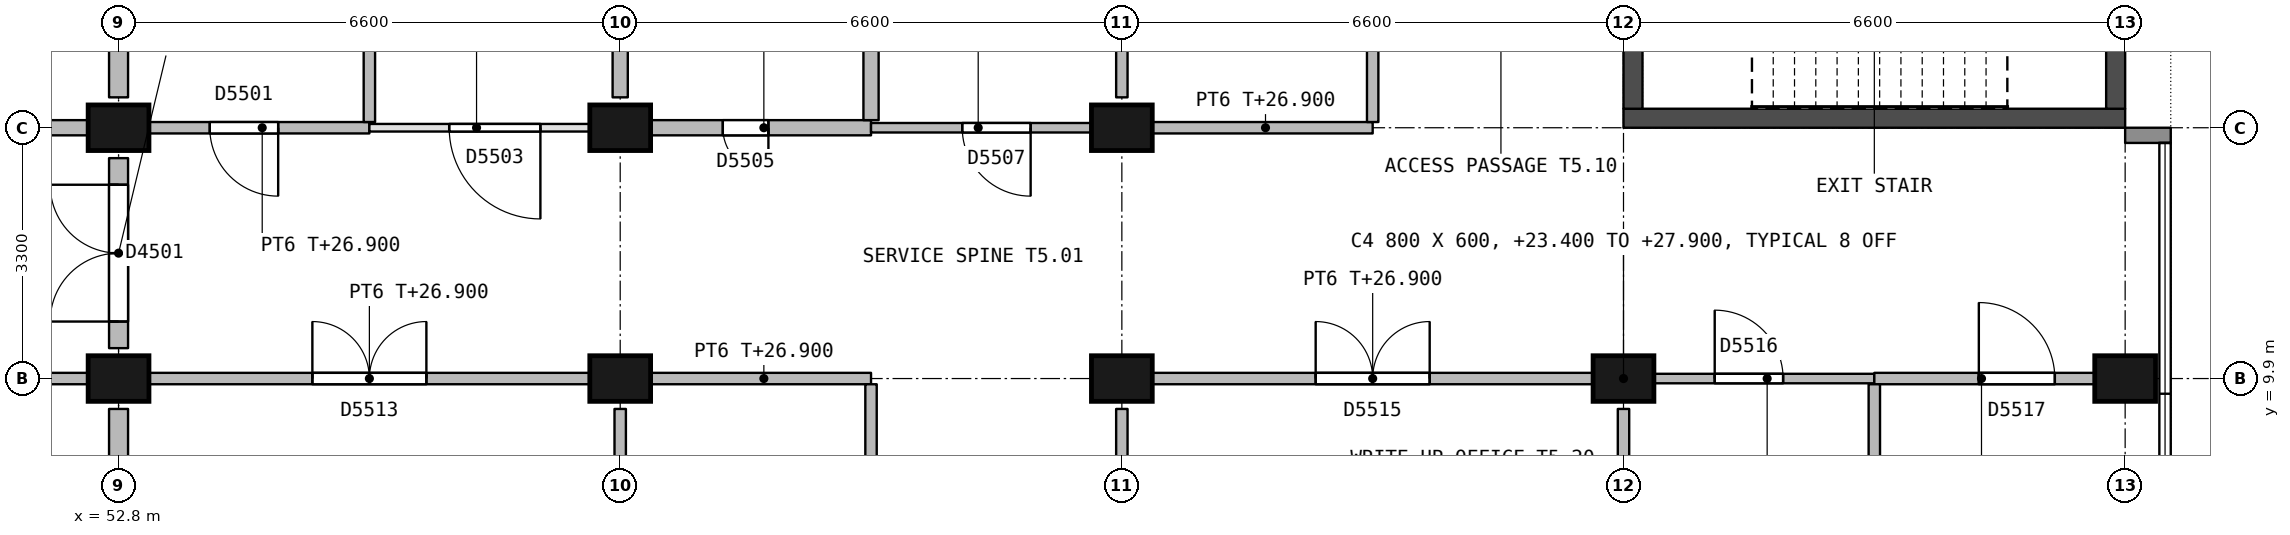
"""IFC4 building model, lengths in metres.
Left out: names, types, materials, properties, quantities, classifications, styles, units other than length and angle.
Written with IfcOpenShell. Run it as: python <this file> out.ifc"""

import sys

from ifc_helpers import new_model, si_unit, direction, frame, frame_2d, origin, origin_2d, place, context, subcontext, project, spatial, rectangle, extrude, element, fill, save


model = new_model("IFC4")
c1 = context("Model", 3, precision=1e-05, world=origin(), true_north=direction((0.0, 1.0)))
c2 = subcontext(c1, "Body", "Model", "MODEL_VIEW")
j1 = project(units=[si_unit("LENGTHUNIT", "METRE"), si_unit("PLANEANGLEUNIT", "RADIAN")], contexts=[c1])
p1 = place(None, origin())
s1 = spatial("IfcSite", under=j1, at=p1, CompositionType="ELEMENT")
p2 = place(p1, origin())
s2 = spatial("IfcBuilding", under=s1, at=p2, CompositionType="ELEMENT")
p3 = place(p2, frame((0.0, 0.0, 23.4)))
s3 = spatial("IfcBuildingStorey", under=s2, at=p3, CompositionType="ELEMENT", Elevation=23.4)
for number, where, z_axis, x_axis in (
    (1, (52.8, 9.9, 0.0), (0.0, 0.0, 1.0), (1.0, 0.0, 0.0)),
    (2, (52.8, 13.2, 0.0), (0.0, 0.0, 1.0), (1.0, 0.0, 0.0)),
    (3, (59.4, 9.9, 0.0), (0.0, 0.0, 1.0), (1.0, 0.0, 0.0)),
    (4, (59.4, 13.2, 0.0), (0.0, 0.0, 1.0), (1.0, 0.0, 0.0)),
    (5, (66.0, 9.9, 0.0), (0.0, 0.0, 1.0), (1.0, 0.0, 0.0)),
    (6, (66.0, 13.2, 0.0), (0.0, 0.0, 1.0), (1.0, 0.0, 0.0)),
    (7, (72.6, 9.9, 0.0), (0.0, 0.0, 1.0), (1.0, 0.0, 0.0)),
    (8, (79.2, 9.9, 0.0), (0.0, 0.0, 1.0), (1.0, 0.0, 0.0)),
):
    element("IfcColumn", number, at=place(p3, frame(where, z_axis=z_axis, x_axis=x_axis)), inside=s3, PredefinedType="COLUMN", context=c2, shape_type="SweptSolid", body=[
        extrude(rectangle(XDim=0.8, YDim=0.6, at=origin_2d()), origin(), (0.0, 0.0, 1.0), 4.5),
    ])
p4 = place(p3, frame((72.6, 13.325, 0.0), z_axis=(0.0, 0.0, 1.0), x_axis=(1.0, 0.0, 0.0)))
e9 = element("IfcWall", 9, at=p4, inside=s3, PredefinedType="SHEAR", context=c2, shape_type="SweptSolid", body=[
    extrude(rectangle(XDim=6.6, YDim=0.25, at=frame_2d((3.3, 0.0))), origin(), (0.0, 0.0, 1.0), 4.2),
])
p5 = place(p3, frame((72.725, 13.45, 0.0), z_axis=(0.0, 0.0, 1.0), x_axis=(0.0, 1.0, 0.0)))
e10 = element("IfcWall", 10, at=p5, inside=s3, PredefinedType="SHEAR", context=c2, shape_type="SweptSolid", body=[
    extrude(rectangle(XDim=9.4, YDim=0.25, at=frame_2d((4.7, 0.0))), origin(), (0.0, 0.0, 1.0), 4.2),
])
p6 = place(p5, frame((4.125, 0.0, 0.0)))
e11 = element("IfcOpeningElement", 11, at=p6, cuts=e10, PredefinedType="OPENING", context=c2, shape_type="SweptSolid", body=[
    extrude(rectangle(XDim=1.2, YDim=2.1, at=frame_2d((0.6, 1.05))), frame((0.0, 0.135, 0.0), z_axis=(0.0, -1.0, 0.0), x_axis=(1.0, 0.0, 0.0)), (0.0, 0.0, 1.0), 0.27),
])
p7 = place(p3, frame((79.075, 13.45, 0.0), z_axis=(0.0, 0.0, 1.0), x_axis=(0.0, 1.0, 0.0)))
e12 = element("IfcWall", 12, at=p7, inside=s3, PredefinedType="SHEAR", context=c2, shape_type="SweptSolid", body=[
    extrude(rectangle(XDim=9.4, YDim=0.25, at=frame_2d((4.7, 0.0))), origin(), (0.0, 0.0, 1.0), 4.2),
])
p8 = place(p7, frame((0.95, 0.0, 0.7)))
e13 = element("IfcOpeningElement", 13, at=p8, cuts=e12, PredefinedType="OPENING", context=c2, shape_type="SweptSolid", body=[
    extrude(rectangle(XDim=1.2, YDim=1.8, at=frame_2d((0.6, 0.9))), frame((0.0, 0.135, 0.0), z_axis=(0.0, -1.0, 0.0), x_axis=(1.0, 0.0, 0.0)), (0.0, 0.0, 1.0), 0.27),
])
p9 = place(p3, frame((79.2, 13.1, 0.0), z_axis=(0.0, 0.0, 1.0), x_axis=(1.0, 0.0, 0.0)))
e14 = element("IfcWall", 14, at=p9, inside=s3, PredefinedType="STANDARD", context=c2, shape_type="SweptSolid", body=[
    extrude(rectangle(XDim=0.6, YDim=0.2, at=frame_2d((0.3, 0.0))), origin(), (0.0, 0.0, 1.0), 3.5),
])
p10 = place(p3, frame((49.5, 13.2, 0.0), z_axis=(0.0, 0.0, 1.0), x_axis=(1.0, 0.0, 0.0)))
e15 = element("IfcWall", 15, at=p10, inside=s3, PredefinedType="PARTITIONING", context=c2, shape_type="SweptSolid", body=[
    extrude(rectangle(XDim=2.9, YDim=0.2, at=frame_2d((1.45, 0.0))), origin(), (0.0, 0.0, 1.0), 3.65),
])
p11 = place(p10, frame((1.35, 0.0, 0.0)))
e16 = element("IfcOpeningElement", 16, at=p11, cuts=e15, PredefinedType="OPENING", context=c2, shape_type="SweptSolid", body=[
    extrude(rectangle(XDim=0.6, YDim=2.1, at=frame_2d((0.3, 1.05))), frame((0.0, 0.11, 0.0), z_axis=(0.0, -1.0, 0.0), x_axis=(1.0, 0.0, 0.0)), (0.0, 0.0, 1.0), 0.22),
])
p12 = place(p3, frame((46.55, 9.9, 0.0), z_axis=(0.0, 0.0, 1.0), x_axis=(1.0, 0.0, 0.0)))
e17 = element("IfcWall", 17, at=p12, inside=s3, PredefinedType="PARTITIONING", context=c2, shape_type="SweptSolid", body=[
    extrude(rectangle(XDim=5.85, YDim=0.15, at=frame_2d((2.925, 0.0))), origin(), (0.0, 0.0, 1.0), 3.65),
])
p13 = place(p12, frame((2.2, 0.0, 0.0)))
e18 = element("IfcOpeningElement", 18, at=p13, cuts=e17, PredefinedType="OPENING", context=c2, shape_type="SweptSolid", body=[
    extrude(rectangle(XDim=1.5, YDim=2.1, at=frame_2d((0.75, 1.05))), frame((0.0, 0.085, 0.0), z_axis=(0.0, -1.0, 0.0), x_axis=(1.0, 0.0, 0.0)), (0.0, 0.0, 1.0), 0.17),
])
p14 = place(p3, frame((52.8, 10.3, 0.0), z_axis=(0.0, 0.0, 1.0), x_axis=(0.0, 1.0, 0.0)))
e19 = element("IfcWall", 19, at=p14, inside=s3, PredefinedType="PARTITIONING", context=c2, shape_type="SweptSolid", body=[
    extrude(rectangle(XDim=2.5, YDim=0.25, at=frame_2d((1.25, 0.0))), origin(), (0.0, 0.0, 1.0), 3.5),
])
p15 = place(p14, frame((0.35, 0.0, 0.0)))
e20 = element("IfcOpeningElement", 20, at=p15, cuts=e19, PredefinedType="OPENING", context=c2, shape_type="SweptSolid", body=[
    extrude(rectangle(XDim=1.8, YDim=2.1, at=frame_2d((0.9, 1.05))), frame((0.0, 0.135, 0.0), z_axis=(0.0, -1.0, 0.0), x_axis=(1.0, 0.0, 0.0)), (0.0, 0.0, 1.0), 0.27),
])
p16 = place(p3, frame((52.8, 13.6, 0.0), z_axis=(0.0, 0.0, 1.0), x_axis=(0.0, 1.0, 0.0)))
e21 = element("IfcWall", 21, at=p16, inside=s3, PredefinedType="PARTITIONING", context=c2, shape_type="SweptSolid", body=[
    extrude(rectangle(XDim=2.8, YDim=0.25, at=frame_2d((1.4, 0.0))), origin(), (0.0, 0.0, 1.0), 3.5),
])
p17 = place(p3, frame((52.8, 3.9, 0.0), z_axis=(0.0, 0.0, 1.0), x_axis=(0.0, 1.0, 0.0)))
e22 = element("IfcWall", 22, at=p17, inside=s3, PredefinedType="PARTITIONING", context=c2, shape_type="SweptSolid", body=[
    extrude(rectangle(XDim=5.6, YDim=0.25, at=frame_2d((2.8, 0.0))), origin(), (0.0, 0.0, 1.0), 3.5),
])
p18 = place(p3, frame((56.1, 13.2, 0.0), z_axis=(0.0, 0.0, 1.0), x_axis=(-1.0, 0.0, 0.0)))
e23 = element("IfcWall", 23, at=p18, inside=s3, PredefinedType="PARTITIONING", context=c2, shape_type="SweptSolid", body=[
    extrude(rectangle(XDim=2.9, YDim=0.15, at=frame_2d((1.45, 0.0))), origin(), (0.0, 0.0, 1.0), 3.5),
])
p19 = place(p18, frame((1.2, 0.0, 0.0)))
e24 = element("IfcOpeningElement", 24, at=p19, cuts=e23, PredefinedType="OPENING", context=c2, shape_type="SweptSolid", body=[
    extrude(rectangle(XDim=0.9, YDim=2.1, at=frame_2d((0.45, 1.05))), frame((0.0, 0.085, 0.0), z_axis=(0.0, -1.0, 0.0), x_axis=(1.0, 0.0, 0.0)), (0.0, 0.0, 1.0), 0.17),
])
p20 = place(p3, frame((56.1, 13.2, 0.0), z_axis=(0.0, 0.0, 1.0), x_axis=(1.0, 0.0, 0.0)))
e25 = element("IfcWall", 25, at=p20, inside=s3, PredefinedType="PARTITIONING", context=c2, shape_type="SweptSolid", body=[
    extrude(rectangle(XDim=2.9, YDim=0.1, at=frame_2d((1.45, 0.0))), origin(), (0.0, 0.0, 1.0), 3.5),
])
p21 = place(p20, frame((1.05, 0.0, 0.0)))
e26 = element("IfcOpeningElement", 26, at=p21, cuts=e25, PredefinedType="OPENING", context=c2, shape_type="SweptSolid", body=[
    extrude(rectangle(XDim=1.2, YDim=2.1, at=frame_2d((0.6, 1.05))), frame((0.0, 0.06, 0.0), z_axis=(0.0, -1.0, 0.0), x_axis=(1.0, 0.0, 0.0)), (0.0, 0.0, 1.0), 0.12),
])
p22 = place(p3, frame((59.8, 13.2, 0.0), z_axis=(0.0, 0.0, 1.0), x_axis=(1.0, 0.0, 0.0)))
e27 = element("IfcWall", 27, at=p22, inside=s3, PredefinedType="PARTITIONING", context=c2, shape_type="SweptSolid", body=[
    extrude(rectangle(XDim=2.9, YDim=0.2, at=frame_2d((1.45, 0.0))), origin(), (0.0, 0.0, 1.0), 3.5),
])
p23 = place(p22, frame((0.95, 0.0, 0.0)))
e28 = element("IfcOpeningElement", 28, at=p23, cuts=e27, PredefinedType="OPENING", context=c2, shape_type="SweptSolid", body=[
    extrude(rectangle(XDim=0.6, YDim=2.1, at=frame_2d((0.3, 1.05))), frame((0.0, 0.11, 0.0), z_axis=(0.0, -1.0, 0.0), x_axis=(1.0, 0.0, 0.0)), (0.0, 0.0, 1.0), 0.22),
])
p24 = place(p3, frame((62.7, 13.2, 0.0), z_axis=(0.0, 0.0, 1.0), x_axis=(1.0, 0.0, 0.0)))
e29 = element("IfcWall", 29, at=p24, inside=s3, PredefinedType="PARTITIONING", context=c2, shape_type="SweptSolid", body=[
    extrude(rectangle(XDim=2.9, YDim=0.125, at=frame_2d((1.45, 0.0))), origin(), (0.0, 0.0, 1.0), 3.5),
])
p25 = place(p24, frame((1.2, 0.0, 0.0)))
e30 = element("IfcOpeningElement", 30, at=p25, cuts=e29, PredefinedType="OPENING", context=c2, shape_type="SweptSolid", body=[
    extrude(rectangle(XDim=0.9, YDim=2.1, at=frame_2d((0.45, 1.05))), frame((0.0, 0.073, 0.0), z_axis=(0.0, -1.0, 0.0), x_axis=(1.0, 0.0, 0.0)), (0.0, 0.0, 1.0), 0.145),
])
p26 = place(p3, frame((69.3, 13.2, 0.0), z_axis=(0.0, 0.0, 1.0), x_axis=(-1.0, 0.0, 0.0)))
e31 = element("IfcWall", 31, at=p26, inside=s3, PredefinedType="PARTITIONING", context=c2, shape_type="SweptSolid", body=[
    extrude(rectangle(XDim=2.9, YDim=0.15, at=frame_2d((1.45, 0.0))), origin(), (0.0, 0.0, 1.0), 3.5),
])
p27 = place(p3, frame((53.2, 9.9, 0.0), z_axis=(0.0, 0.0, 1.0), x_axis=(1.0, 0.0, 0.0)))
e32 = element("IfcWall", 32, at=p27, inside=s3, PredefinedType="PARTITIONING", context=c2, shape_type="SweptSolid", body=[
    extrude(rectangle(XDim=5.8, YDim=0.15, at=frame_2d((2.9, 0.0))), origin(), (0.0, 0.0, 1.0), 3.5),
])
p28 = place(p27, frame((2.15, 0.0, 0.0)))
e33 = element("IfcOpeningElement", 33, at=p28, cuts=e32, PredefinedType="OPENING", context=c2, shape_type="SweptSolid", body=[
    extrude(rectangle(XDim=1.5, YDim=2.1, at=frame_2d((0.75, 1.05))), frame((0.0, 0.085, 0.0), z_axis=(0.0, -1.0, 0.0), x_axis=(1.0, 0.0, 0.0)), (0.0, 0.0, 1.0), 0.17),
])
p29 = place(p3, frame((59.8, 9.9, 0.0), z_axis=(0.0, 0.0, 1.0), x_axis=(1.0, 0.0, 0.0)))
e34 = element("IfcWall", 34, at=p29, inside=s3, PredefinedType="PARTITIONING", context=c2, shape_type="SweptSolid", body=[
    extrude(rectangle(XDim=2.9, YDim=0.15, at=frame_2d((1.45, 0.0))), origin(), (0.0, 0.0, 1.0), 3.5),
])
p30 = place(p3, frame((66.4, 9.9, 0.0), z_axis=(0.0, 0.0, 1.0), x_axis=(1.0, 0.0, 0.0)))
e35 = element("IfcWall", 35, at=p30, inside=s3, PredefinedType="PARTITIONING", context=c2, shape_type="SweptSolid", body=[
    extrude(rectangle(XDim=5.8, YDim=0.15, at=frame_2d((2.9, 0.0))), origin(), (0.0, 0.0, 1.0), 3.5),
])
p31 = place(p30, frame((2.15, 0.0, 0.0)))
e36 = element("IfcOpeningElement", 36, at=p31, cuts=e35, PredefinedType="OPENING", context=c2, shape_type="SweptSolid", body=[
    extrude(rectangle(XDim=1.5, YDim=2.1, at=frame_2d((0.75, 1.05))), frame((0.0, 0.085, 0.0), z_axis=(0.0, -1.0, 0.0), x_axis=(1.0, 0.0, 0.0)), (0.0, 0.0, 1.0), 0.17),
])
p32 = place(p3, frame((75.9, 9.9, 0.0), z_axis=(0.0, 0.0, 1.0), x_axis=(-1.0, 0.0, 0.0)))
e37 = element("IfcWall", 37, at=p32, inside=s3, PredefinedType="PARTITIONING", context=c2, shape_type="SweptSolid", body=[
    extrude(rectangle(XDim=2.9, YDim=0.125, at=frame_2d((1.45, 0.0))), origin(), (0.0, 0.0, 1.0), 3.5),
])
p33 = place(p32, frame((1.2, 0.0, 0.0)))
e38 = element("IfcOpeningElement", 38, at=p33, cuts=e37, PredefinedType="OPENING", context=c2, shape_type="SweptSolid", body=[
    extrude(rectangle(XDim=0.9, YDim=2.1, at=frame_2d((0.45, 1.05))), frame((0.0, 0.073, 0.0), z_axis=(0.0, -1.0, 0.0), x_axis=(1.0, 0.0, 0.0)), (0.0, 0.0, 1.0), 0.145),
])
p34 = place(p3, frame((75.9, 9.9, 0.0), z_axis=(0.0, 0.0, 1.0), x_axis=(1.0, 0.0, 0.0)))
e39 = element("IfcWall", 39, at=p34, inside=s3, PredefinedType="PARTITIONING", context=c2, shape_type="SweptSolid", body=[
    extrude(rectangle(XDim=2.9, YDim=0.15, at=frame_2d((1.45, 0.0))), origin(), (0.0, 0.0, 1.0), 3.5),
])
p35 = place(p34, frame((1.375, 0.0, 0.0)))
e40 = element("IfcOpeningElement", 40, at=p35, cuts=e39, PredefinedType="OPENING", context=c2, shape_type="SweptSolid", body=[
    extrude(rectangle(XDim=1.0, YDim=2.1, at=frame_2d((0.5, 1.05))), frame((0.0, 0.085, 0.0), z_axis=(0.0, -1.0, 0.0), x_axis=(1.0, 0.0, 0.0)), (0.0, 0.0, 1.0), 0.17),
])
p36 = place(p3, frame((56.1, 13.275, 0.0), z_axis=(0.0, 0.0, 1.0), x_axis=(0.0, 1.0, 0.0)))
e41 = element("IfcWall", 41, at=p36, inside=s3, PredefinedType="PARTITIONING", context=c2, shape_type="SweptSolid", body=[
    extrude(rectangle(XDim=3.15, YDim=0.15, at=frame_2d((1.575, 0.0))), origin(), (0.0, 0.0, 1.0), 4.2),
])
p37 = place(p3, frame((59.4, 13.6, 0.0), z_axis=(0.0, 0.0, 1.0), x_axis=(0.0, 1.0, 0.0)))
e42 = element("IfcWall", 42, at=p37, inside=s3, PredefinedType="PARTITIONING", context=c2, shape_type="SweptSolid", body=[
    extrude(rectangle(XDim=2.9, YDim=0.2, at=frame_2d((1.45, 0.0))), origin(), (0.0, 0.0, 1.0), 3.3),
])
p38 = place(p3, frame((62.7, 13.3, 0.0), z_axis=(0.0, 0.0, 1.0), x_axis=(0.0, 1.0, 0.0)))
e43 = element("IfcWall", 43, at=p38, inside=s3, PredefinedType="PARTITIONING", context=c2, shape_type="SweptSolid", body=[
    extrude(rectangle(XDim=3.1, YDim=0.2, at=frame_2d((1.55, 0.0))), origin(), (0.0, 0.0, 1.0), 4.2),
])
p39 = place(p3, frame((66.0, 13.6, 0.0), z_axis=(0.0, 0.0, 1.0), x_axis=(0.0, 1.0, 0.0)))
e44 = element("IfcWall", 44, at=p39, inside=s3, PredefinedType="PARTITIONING", context=c2, shape_type="SweptSolid", body=[
    extrude(rectangle(XDim=9.1, YDim=0.15, at=frame_2d((4.55, 0.0))), origin(), (0.0, 0.0, 1.0), 3.3),
])
p40 = place(p3, frame((69.3, 23.55, 0.0), z_axis=(0.0, 0.0, 1.0), x_axis=(0.0, -1.0, 0.0)))
e45 = element("IfcWall", 45, at=p40, inside=s3, PredefinedType="PARTITIONING", context=c2, shape_type="SweptSolid", body=[
    extrude(rectangle(XDim=10.275, YDim=0.15, at=frame_2d((5.138, 0.0))), origin(), (0.0, 0.0, 1.0), 4.2),
])
p41 = place(p40, frame((4.275, 0.0, 0.0)))
e46 = element("IfcOpeningElement", 46, at=p41, cuts=e45, PredefinedType="OPENING", context=c2, shape_type="SweptSolid", body=[
    extrude(rectangle(XDim=1.8, YDim=2.4, at=frame_2d((0.9, 1.2))), frame((0.0, 0.085, 0.0), z_axis=(0.0, -1.0, 0.0), x_axis=(1.0, 0.0, 0.0)), (0.0, 0.0, 1.0), 0.17),
])
p42 = place(p3, frame((59.4, 3.975, 0.0), z_axis=(0.0, 0.0, 1.0), x_axis=(0.0, 1.0, 0.0)))
e47 = element("IfcWall", 47, at=p42, inside=s3, PredefinedType="PARTITIONING", context=c2, shape_type="SweptSolid", body=[
    extrude(rectangle(XDim=5.525, YDim=0.15, at=frame_2d((2.762, 0.0))), origin(), (0.0, 0.0, 1.0), 3.3),
])
p43 = place(p3, frame((62.7, 9.825, 0.0), z_axis=(0.0, 0.0, 1.0), x_axis=(0.0, -1.0, 0.0)))
e48 = element("IfcWall", 48, at=p43, inside=s3, PredefinedType="PARTITIONING", context=c2, shape_type="SweptSolid", body=[
    extrude(rectangle(XDim=5.85, YDim=0.15, at=frame_2d((2.925, 0.0))), origin(), (0.0, 0.0, 1.0), 4.2),
])
p44 = place(p43, frame((2.425, 0.0, 0.0)))
e49 = element("IfcOpeningElement", 49, at=p44, cuts=e48, PredefinedType="OPENING", context=c2, shape_type="SweptSolid", body=[
    extrude(rectangle(XDim=1.0, YDim=2.1, at=frame_2d((0.5, 1.05))), frame((0.0, 0.085, 0.0), z_axis=(0.0, -1.0, 0.0), x_axis=(1.0, 0.0, 0.0)), (0.0, 0.0, 1.0), 0.17),
])
for number, where, z_axis, x_axis in (
    (50, (66.0, 3.975, 0.0), (0.0, 0.0, 1.0), (0.0, 1.0, 0.0)),
    (51, (72.6, 3.975, 0.0), (0.0, 0.0, 1.0), (0.0, 1.0, 0.0)),
):
    element("IfcWall", number, at=place(p3, frame(where, z_axis=z_axis, x_axis=x_axis)), inside=s3, PredefinedType="PARTITIONING", context=c2, shape_type="SweptSolid", body=[
        extrude(rectangle(XDim=5.525, YDim=0.15, at=frame_2d((2.762, 0.0))), origin(), (0.0, 0.0, 1.0), 3.3),
    ])
p45 = place(p3, frame((75.9, 3.962, 0.0), z_axis=(0.0, 0.0, 1.0), x_axis=(0.0, 1.0, 0.0)))
e52 = element("IfcWall", 52, at=p45, inside=s3, PredefinedType="PARTITIONING", context=c2, shape_type="SweptSolid", body=[
    extrude(rectangle(XDim=5.863, YDim=0.15, at=frame_2d((2.931, 0.0))), origin(), (0.0, 0.0, 1.0), 4.2),
])
p46 = place(p15, origin())
e53 = element("IfcDoor", 53, at=p46, inside=s3, OperationType="DOUBLE_DOOR_SINGLE_SWING", PredefinedType="DOOR", context=c2, shape_type="SweptSolid", body=[
    extrude(rectangle(XDim=1.8, YDim=2.1, at=frame_2d((0.9, 1.05))), frame((0.0, 0.03, 0.0), z_axis=(0.0, -1.0, 0.0), x_axis=(1.0, 0.0, 0.0)), (0.0, 0.0, 1.0), 0.06),
])
fill(e20, e53)
p47 = place(p19, origin())
e54 = element("IfcDoor", 54, at=p47, inside=s3, OperationType="SINGLE_SWING_LEFT", PredefinedType="DOOR", context=c2, shape_type="SweptSolid", body=[
    extrude(rectangle(XDim=0.9, YDim=2.1, at=frame_2d((0.45, 1.05))), frame((0.0, 0.027, 0.0), z_axis=(0.0, -1.0, 0.0), x_axis=(1.0, 0.0, 0.0)), (0.0, 0.0, 1.0), 0.054),
])
fill(e24, e54)
p48 = place(p21, origin())
e55 = element("IfcDoor", 55, at=p48, inside=s3, OperationType="SINGLE_SWING_RIGHT", PredefinedType="DOOR", context=c2, shape_type="SweptSolid", body=[
    extrude(rectangle(XDim=1.2, YDim=2.1, at=frame_2d((0.6, 1.05))), frame((0.0, 0.022, 0.0), z_axis=(0.0, -1.0, 0.0), x_axis=(1.0, 0.0, 0.0)), (0.0, 0.0, 1.0), 0.044),
])
fill(e26, e55)
p49 = place(p23, origin())
e56 = element("IfcDoor", 56, at=p49, inside=s3, OperationType="SINGLE_SWING_RIGHT", PredefinedType="DOOR", context=c2, shape_type="SweptSolid", body=[
    extrude(rectangle(XDim=0.6, YDim=2.1, at=frame_2d((0.3, 1.05))), frame((0.0, 0.03, 0.0), z_axis=(0.0, -1.0, 0.0), x_axis=(1.0, 0.0, 0.0)), (0.0, 0.0, 1.0), 0.06),
])
fill(e28, e56)
p50 = place(p25, origin())
e57 = element("IfcDoor", 57, at=p50, inside=s3, OperationType="SINGLE_SWING_RIGHT", PredefinedType="DOOR", context=c2, shape_type="SweptSolid", body=[
    extrude(rectangle(XDim=0.9, YDim=2.1, at=frame_2d((0.45, 1.05))), frame((0.0, 0.027, 0.0), z_axis=(0.0, -1.0, 0.0), x_axis=(1.0, 0.0, 0.0)), (0.0, 0.0, 1.0), 0.054),
])
fill(e30, e57)
p51 = place(p28, origin())
e58 = element("IfcDoor", 58, at=p51, inside=s3, OperationType="DOUBLE_DOOR_SINGLE_SWING", PredefinedType="DOOR", context=c2, shape_type="SweptSolid", body=[
    extrude(rectangle(XDim=1.5, YDim=2.1, at=frame_2d((0.75, 1.05))), frame((0.0, 0.027, 0.0), z_axis=(0.0, -1.0, 0.0), x_axis=(1.0, 0.0, 0.0)), (0.0, 0.0, 1.0), 0.054),
])
fill(e33, e58)
p52 = place(p31, origin())
e59 = element("IfcDoor", 59, at=p52, inside=s3, OperationType="DOUBLE_DOOR_SINGLE_SWING", PredefinedType="DOOR", context=c2, shape_type="SweptSolid", body=[
    extrude(rectangle(XDim=1.5, YDim=2.1, at=frame_2d((0.75, 1.05))), frame((0.0, 0.027, 0.0), z_axis=(0.0, -1.0, 0.0), x_axis=(1.0, 0.0, 0.0)), (0.0, 0.0, 1.0), 0.054),
])
fill(e36, e59)
p53 = place(p33, origin())
e60 = element("IfcDoor", 60, at=p53, inside=s3, OperationType="SINGLE_SWING_RIGHT", PredefinedType="DOOR", context=c2, shape_type="SweptSolid", body=[
    extrude(rectangle(XDim=0.9, YDim=2.1, at=frame_2d((0.45, 1.05))), frame((0.0, 0.027, 0.0), z_axis=(0.0, -1.0, 0.0), x_axis=(1.0, 0.0, 0.0)), (0.0, 0.0, 1.0), 0.054),
])
fill(e38, e60)
p54 = place(p35, origin())
e61 = element("IfcDoor", 61, at=p54, inside=s3, OperationType="SINGLE_SWING_LEFT", PredefinedType="DOOR", context=c2, shape_type="SweptSolid", body=[
    extrude(rectangle(XDim=1.0, YDim=2.1, at=frame_2d((0.5, 1.05))), frame((0.0, 0.027, 0.0), z_axis=(0.0, -1.0, 0.0), x_axis=(1.0, 0.0, 0.0)), (0.0, 0.0, 1.0), 0.054),
])
fill(e40, e61)
save(model, sys.argv[1])
